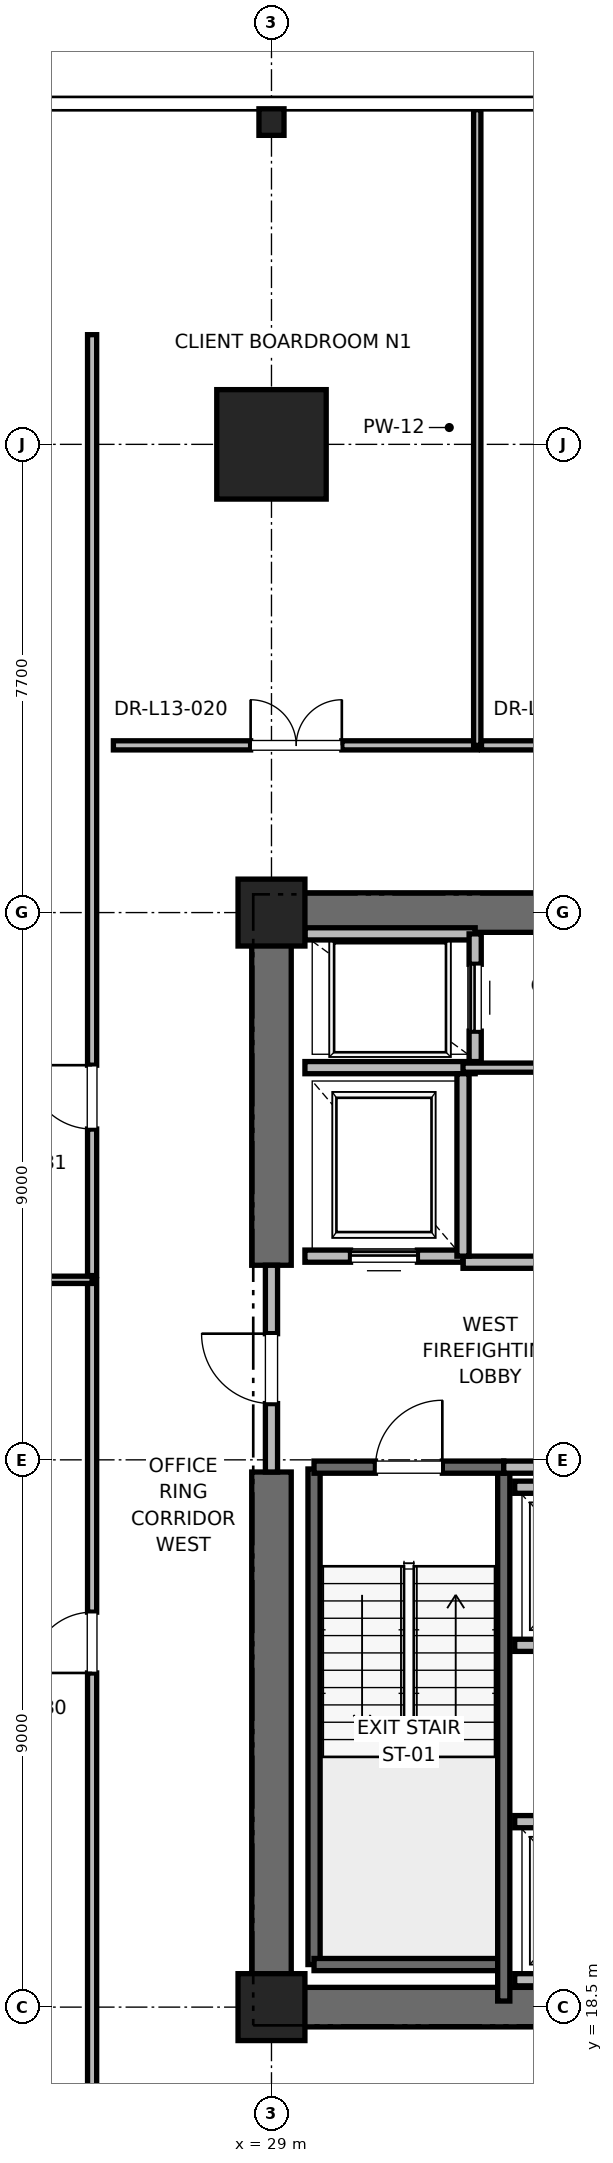
"""IFC4 building model, lengths in metres.
Left out: names, types, materials, properties, quantities, classifications, styles, units other than length and angle.
Written with IfcOpenShell. Run it as: python <this file> out.ifc"""

import sys

from ifc_helpers import new_model, si_unit, direction, frame, frame_2d, origin, origin_2d, place, context, subcontext, project, spatial, rectangle, i_section, extrude, element, fill, save


model = new_model("IFC4")
c1 = context("Model", 3, precision=1e-05, world=origin(), true_north=direction((0.0, 1.0)))
c2 = subcontext(c1, "Body", "Model", "MODEL_VIEW")
j1 = project(units=[si_unit("LENGTHUNIT", "METRE"), si_unit("PLANEANGLEUNIT", "RADIAN")], contexts=[c1])
p1 = place(None, origin())
s1 = spatial("IfcSite", under=j1, at=p1, CompositionType="ELEMENT")
p2 = place(p1, origin())
s2 = spatial("IfcBuilding", under=s1, at=p2, CompositionType="ELEMENT")
p3 = place(p2, frame((0.0, 0.0, 59.6)))
s3 = spatial("IfcBuildingStorey", under=s2, at=p3, CompositionType="ELEMENT", Elevation=59.6)
p4 = place(p3, frame((29.0, 44.2, 0.0), z_axis=(0.0, 0.0, 1.0), x_axis=(1.0, 0.0, 0.0)))
e1 = element("IfcColumn", 1, at=p4, inside=s3, PredefinedType="COLUMN", context=c2, shape_type="SweptSolid", body=[
    extrude(rectangle(XDim=1.8, YDim=1.8, at=origin_2d()), origin(), (0.0, 0.0, 1.0), 4.0),
])
p5 = place(p3, frame((29.0, 49.5, 0.0), z_axis=(0.0, 0.0, 1.0), x_axis=(1.0, 0.0, 0.0)))
e2 = element("IfcColumn", 2, at=p5, inside=s3, PredefinedType="COLUMN", context=c2, shape_type="SweptSolid", body=[
    extrude(i_section(OverallWidth=0.412, OverallDepth=0.437, WebThickness=0.036, FlangeThickness=0.058, FilletRadius=0.015, at=origin_2d()), origin(), (0.0, 0.0, 1.0), 4.0),
])
for number, where, z_axis, x_axis in (
    (3, (29.0, 18.5, 0.0), (0.0, 0.0, 1.0), (1.0, 0.0, 0.0)),
    (4, (29.0, 36.5, 0.0), (0.0, 0.0, 1.0), (1.0, 0.0, 0.0)),
):
    element("IfcColumn", number, at=place(p3, frame(where, z_axis=z_axis, x_axis=x_axis)), inside=s3, PredefinedType="PILASTER", context=c2, shape_type="SweptSolid", body=[
        extrude(rectangle(XDim=1.1, YDim=1.1, at=origin_2d()), origin(), (0.0, 0.0, 1.0), 4.0),
    ])
p6 = place(p3, frame((29.0, 18.5, 0.0), z_axis=(0.0, 0.0, 1.0), x_axis=(1.0, 0.0, 0.0)))
e5 = element("IfcWall", 5, at=p6, inside=s3, PredefinedType="SHEAR", context=c2, shape_type="SweptSolid", body=[
    extrude(rectangle(XDim=9.2, YDim=0.65, at=frame_2d((4.6, 0.0))), origin(), (0.0, 0.0, 1.0), 3.76),
])
p7 = place(p3, frame((29.0, 36.5, 0.0), z_axis=(0.0, 0.0, 1.0), x_axis=(1.0, 0.0, 0.0)))
e6 = element("IfcWall", 6, at=p7, inside=s3, PredefinedType="SHEAR", context=c2, shape_type="SweptSolid", body=[
    extrude(rectangle(XDim=5.8, YDim=0.65, at=frame_2d((2.9, 0.0))), origin(), (0.0, 0.0, 1.0), 3.76),
])
p8 = place(p3, frame((29.0, 18.5, 0.0), z_axis=(0.0, 0.0, 1.0), x_axis=(0.0, 1.0, 0.0)))
e7 = element("IfcWall", 7, at=p8, inside=s3, PredefinedType="SHEAR", context=c2, shape_type="SweptSolid", body=[
    extrude(rectangle(XDim=8.8, YDim=0.65, at=frame_2d((4.4, 0.0))), origin(), (0.0, 0.0, 1.0), 3.76),
])
p9 = place(p3, frame((29.0, 30.7, 0.0), z_axis=(0.0, 0.0, 1.0), x_axis=(0.0, 1.0, 0.0)))
e8 = element("IfcWall", 8, at=p9, inside=s3, PredefinedType="SHEAR", context=c2, shape_type="SweptSolid", body=[
    extrude(rectangle(XDim=5.8, YDim=0.65, at=frame_2d((2.9, 0.0))), origin(), (0.0, 0.0, 1.0), 3.76),
])
p10 = place(p3, frame((29.7, 19.2, 0.0), z_axis=(0.0, 0.0, 1.0), x_axis=(0.0, 1.0, 0.0)))
e9 = element("IfcWall", 9, at=p10, inside=s3, PredefinedType="SOLIDWALL", context=c2, shape_type="SweptSolid", body=[
    extrude(rectangle(XDim=8.15, YDim=0.2, at=frame_2d((4.075, 0.0))), origin(), (0.0, 0.0, 1.0), 3.76),
])
p11 = place(p3, frame((29.7, 19.2, 0.0), z_axis=(0.0, 0.0, 1.0), x_axis=(1.0, 0.0, 0.0)))
e10 = element("IfcWall", 10, at=p11, inside=s3, PredefinedType="SOLIDWALL", context=c2, shape_type="SweptSolid", body=[
    extrude(rectangle(XDim=3.12, YDim=0.2, at=frame_2d((1.56, 0.0))), origin(), (0.0, 0.0, 1.0), 3.76),
])
p12 = place(p3, frame((32.82, 18.6, 0.0), z_axis=(0.0, 0.0, 1.0), x_axis=(0.0, 1.0, 0.0)))
e11 = element("IfcWall", 11, at=p12, inside=s3, PredefinedType="SOLIDWALL", context=c2, shape_type="SweptSolid", body=[
    extrude(rectangle(XDim=8.78, YDim=0.2, at=frame_2d((4.39, 0.0))), origin(), (0.0, 0.0, 1.0), 3.76),
])
p13 = place(p3, frame((29.7, 27.38, 0.0), z_axis=(0.0, 0.0, 1.0), x_axis=(1.0, 0.0, 0.0)))
e12 = element("IfcWall", 12, at=p13, inside=s3, PredefinedType="SOLIDWALL", context=c2, shape_type="SweptSolid", body=[
    extrude(rectangle(XDim=3.12, YDim=0.2, at=frame_2d((1.56, 0.0))), origin(), (0.0, 0.0, 1.0), 3.76),
])
p14 = place(p13, frame((1.01, 0.0, 0.0)))
e13 = element("IfcOpeningElement", 13, at=p14, cuts=e12, PredefinedType="OPENING", context=c2, shape_type="SweptSolid", body=[
    extrude(rectangle(XDim=1.1, YDim=2.15, at=frame_2d((0.55, 1.075))), frame((0.0, 0.1, 0.0), z_axis=(0.0, -1.0, 0.0), x_axis=(1.0, 0.0, 0.0)), (0.0, 0.0, 1.0), 0.2),
])
p15 = place(p3, frame((29.0, 27.3, 0.0), z_axis=(0.0, 0.0, 1.0), x_axis=(0.0, 1.0, 0.0)))
e14 = element("IfcWall", 14, at=p15, inside=s3, PredefinedType="PARTITIONING", context=c2, shape_type="SweptSolid", body=[
    extrude(rectangle(XDim=3.4, YDim=0.2, at=frame_2d((1.7, 0.0))), origin(), (0.0, 0.0, 1.0), 2.54),
])
p16 = place(p15, frame((1.125, 0.0, 0.0)))
e15 = element("IfcOpeningElement", 15, at=p16, cuts=e14, PredefinedType="OPENING", context=c2, shape_type="SweptSolid", body=[
    extrude(rectangle(XDim=1.15, YDim=2.2, at=frame_2d((0.575, 1.1))), frame((0.0, 0.1, 0.0), z_axis=(0.0, -1.0, 0.0), x_axis=(1.0, 0.0, 0.0)), (0.0, 0.0, 1.0), 0.2),
])
p17 = place(p3, frame((32.82, 27.38, 0.0), z_axis=(0.0, 0.0, 1.0), x_axis=(1.0, 0.0, 0.0)))
e16 = element("IfcWall", 16, at=p17, inside=s3, PredefinedType="PARTITIONING", context=c2, shape_type="SweptSolid", body=[
    extrude(rectangle(XDim=5.62, YDim=0.2, at=frame_2d((2.81, 0.0))), origin(), (0.0, 0.0, 1.0), 3.76),
])
p18 = place(p3, frame((32.15, 30.75, 0.0), z_axis=(0.0, 0.0, 1.0), x_axis=(1.0, 0.0, 0.0)))
e17 = element("IfcWall", 17, at=p18, inside=s3, PredefinedType="PARTITIONING", context=c2, shape_type="SweptSolid", body=[
    extrude(rectangle(XDim=3.13, YDim=0.2, at=frame_2d((1.565, 0.0))), origin(), (0.0, 0.0, 1.0), 3.76),
])
p19 = place(p3, frame((29.55, 30.85, 0.0), z_axis=(0.0, 0.0, 1.0), x_axis=(1.0, 0.0, 0.0)))
e18 = element("IfcWall", 18, at=p19, inside=s3, PredefinedType="SOLIDWALL", context=c2, shape_type="SweptSolid", body=[
    extrude(rectangle(XDim=2.6, YDim=0.2, at=frame_2d((1.3, 0.0))), origin(), (0.0, 0.0, 1.0), 2.54),
])
p20 = place(p19, frame((0.75, 0.0, 0.0)))
e19 = element("IfcOpeningElement", 19, at=p20, cuts=e18, PredefinedType="OPENING", context=c2, shape_type="SweptSolid", body=[
    extrude(rectangle(XDim=1.1, YDim=2.2, at=frame_2d((0.55, 1.1))), frame((0.0, 0.1, 0.0), z_axis=(0.0, -1.0, 0.0), x_axis=(1.0, 0.0, 0.0)), (0.0, 0.0, 1.0), 0.2),
])
p21 = place(p3, frame((29.55, 33.95, 0.0), z_axis=(0.0, 0.0, 1.0), x_axis=(1.0, 0.0, 0.0)))
e20 = element("IfcWall", 20, at=p21, inside=s3, PredefinedType="SOLIDWALL", context=c2, shape_type="SweptSolid", body=[
    extrude(rectangle(XDim=2.8, YDim=0.2, at=frame_2d((1.4, 0.0))), origin(), (0.0, 0.0, 1.0), 3.76),
])
p22 = place(p3, frame((32.15, 30.85, 0.0), z_axis=(0.0, 0.0, 1.0), x_axis=(0.0, 1.0, 0.0)))
e21 = element("IfcWall", 21, at=p22, inside=s3, PredefinedType="SOLIDWALL", context=c2, shape_type="SweptSolid", body=[
    extrude(rectangle(XDim=3.0, YDim=0.2, at=frame_2d((1.5, 0.0))), origin(), (0.0, 0.0, 1.0), 3.76),
])
p23 = place(p3, frame((32.35, 36.15, 0.0), z_axis=(0.0, 0.0, 1.0), x_axis=(-1.0, 0.0, 0.0)))
e22 = element("IfcWall", 22, at=p23, inside=s3, PredefinedType="SOLIDWALL", context=c2, shape_type="SweptSolid", body=[
    extrude(rectangle(XDim=2.8, YDim=0.2, at=frame_2d((1.4, 0.0))), origin(), (0.0, 0.0, 1.0), 2.889),
])
p24 = place(p3, frame((32.35, 34.05, 0.0), z_axis=(0.0, 0.0, 1.0), x_axis=(0.0, 1.0, 0.0)))
e23 = element("IfcWall", 23, at=p24, inside=s3, PredefinedType="SOLIDWALL", context=c2, shape_type="SweptSolid", body=[
    extrude(rectangle(XDim=2.1, YDim=0.2, at=frame_2d((1.05, 0.0))), origin(), (0.0, 0.0, 1.0), 3.76),
])
p25 = place(p24, frame((0.5, 0.0, 0.0)))
e24 = element("IfcOpeningElement", 24, at=p25, cuts=e23, PredefinedType="OPENING", context=c2, shape_type="SweptSolid", body=[
    extrude(rectangle(XDim=1.1, YDim=2.2, at=frame_2d((0.55, 1.1))), frame((0.0, 0.1, 0.0), z_axis=(0.0, -1.0, 0.0), x_axis=(1.0, 0.0, 0.0)), (0.0, 0.0, 1.0), 0.2),
])
p26 = place(p3, frame((33.0, 18.95, 0.0), z_axis=(0.0, 0.0, 1.0), x_axis=(1.0, 0.0, 0.0)))
e25 = element("IfcWall", 25, at=p26, inside=s3, PredefinedType="SOLIDWALL", context=c2, shape_type="SweptSolid", body=[
    extrude(rectangle(XDim=2.3, YDim=0.2, at=frame_2d((1.15, 0.0))), origin(), (0.0, 0.0, 1.0), 3.76),
])
p27 = place(p3, frame((35.3, 21.55, 0.0), z_axis=(0.0, 0.0, 1.0), x_axis=(-1.0, 0.0, 0.0)))
e26 = element("IfcWall", 26, at=p27, inside=s3, PredefinedType="SOLIDWALL", context=c2, shape_type="SweptSolid", body=[
    extrude(rectangle(XDim=2.3, YDim=0.2, at=frame_2d((1.15, 0.0))), origin(), (0.0, 0.0, 1.0), 3.76),
])
p28 = place(p27, frame((0.6, 0.0, 0.0)))
e27 = element("IfcOpeningElement", 27, at=p28, cuts=e26, PredefinedType="OPENING", context=c2, shape_type="SweptSolid", body=[
    extrude(rectangle(XDim=1.1, YDim=2.2, at=frame_2d((0.55, 1.1))), frame((0.0, 0.1, 0.0), z_axis=(0.0, -1.0, 0.0), x_axis=(1.0, 0.0, 0.0)), (0.0, 0.0, 1.0), 0.2),
])
p29 = place(p3, frame((33.0, 24.45, 0.0), z_axis=(0.0, 0.0, 1.0), x_axis=(1.0, 0.0, 0.0)))
e28 = element("IfcWall", 28, at=p29, inside=s3, PredefinedType="SOLIDWALL", context=c2, shape_type="SweptSolid", body=[
    extrude(rectangle(XDim=2.3, YDim=0.2, at=frame_2d((1.15, 0.0))), origin(), (0.0, 0.0, 1.0), 3.76),
])
p30 = place(p29, frame((0.6, 0.0, 0.0)))
e29 = element("IfcOpeningElement", 29, at=p30, cuts=e28, PredefinedType="OPENING", context=c2, shape_type="SweptSolid", body=[
    extrude(rectangle(XDim=1.1, YDim=2.2, at=frame_2d((0.55, 1.1))), frame((0.0, 0.1, 0.0), z_axis=(0.0, -1.0, 0.0), x_axis=(1.0, 0.0, 0.0)), (0.0, 0.0, 1.0), 0.2),
])
p31 = place(p3, frame((35.3, 27.05, 0.0), z_axis=(0.0, 0.0, 1.0), x_axis=(-1.0, 0.0, 0.0)))
e30 = element("IfcWall", 30, at=p31, inside=s3, PredefinedType="SOLIDWALL", context=c2, shape_type="SweptSolid", body=[
    extrude(rectangle(XDim=2.3, YDim=0.2, at=frame_2d((1.15, 0.0))), origin(), (0.0, 0.0, 1.0), 3.76),
])
p32 = place(p3, frame((32.15, 33.95, 0.0), z_axis=(0.0, 0.0, 1.0), x_axis=(1.0, 0.0, 0.0)))
e31 = element("IfcWall", 31, at=p32, inside=s3, PredefinedType="PARTITIONING", context=c2, shape_type="SweptSolid", body=[
    extrude(rectangle(XDim=3.13, YDim=0.15, at=frame_2d((1.565, 0.0))), origin(), (0.0, 0.0, 1.0), 2.85),
])
p33 = place(p3, frame((26.4, 39.25, 0.0), z_axis=(0.0, 0.0, 1.0), x_axis=(1.0, 0.0, 0.0)))
e32 = element("IfcWall", 32, at=p33, inside=s3, PredefinedType="PARTITIONING", context=c2, shape_type="SweptSolid", body=[
    extrude(rectangle(XDim=5.984, YDim=0.15, at=frame_2d((2.992, 0.0))), origin(), (0.0, 0.0, 1.0), 2.85),
])
p34 = place(p33, frame((2.257, 0.0, 0.0)))
e33 = element("IfcOpeningElement", 33, at=p34, cuts=e32, PredefinedType="OPENING", context=c2, shape_type="SweptSolid", body=[
    extrude(rectangle(XDim=1.5, YDim=2.25, at=frame_2d((0.75, 1.125))), frame((0.0, 0.075, 0.0), z_axis=(0.0, -1.0, 0.0), x_axis=(1.0, 0.0, 0.0)), (0.0, 0.0, 1.0), 0.15),
])
p35 = place(p3, frame((32.384, 39.25, 0.0), z_axis=(0.0, 0.0, 1.0), x_axis=(0.0, 1.0, 0.0)))
e34 = element("IfcWall", 34, at=p35, inside=s3, PredefinedType="PARTITIONING", context=c2, shape_type="SweptSolid", body=[
    extrude(rectangle(XDim=10.454, YDim=0.12, at=frame_2d((5.227, 0.0))), origin(), (0.0, 0.0, 1.0), 2.39),
])
p36 = place(p3, frame((32.454, 39.25, 0.0), z_axis=(0.0, 0.0, 1.0), x_axis=(1.0, 0.0, 0.0)))
e35 = element("IfcWall", 35, at=p36, inside=s3, PredefinedType="PARTITIONING", context=c2, shape_type="SweptSolid", body=[
    extrude(rectangle(XDim=6.458, YDim=0.15, at=frame_2d((3.229, 0.0))), origin(), (0.0, 0.0, 1.0), 2.85),
])
p37 = place(p36, frame((2.694, 0.0, 0.0)))
e36 = element("IfcOpeningElement", 36, at=p37, cuts=e35, PredefinedType="OPENING", context=c2, shape_type="SweptSolid", body=[
    extrude(rectangle(XDim=1.0, YDim=2.15, at=frame_2d((0.5, 1.075))), frame((0.0, 0.075, 0.0), z_axis=(0.0, -1.0, 0.0), x_axis=(1.0, 0.0, 0.0)), (0.0, 0.0, 1.0), 0.15),
])
p38 = place(p3, frame((26.05, 8.996, 0.0), z_axis=(0.0, 0.0, 1.0), x_axis=(0.0, 1.0, 0.0)))
e37 = element("IfcWall", 37, at=p38, inside=s3, PredefinedType="PARTITIONING", context=c2, shape_type="SweptSolid", body=[
    extrude(rectangle(XDim=21.464, YDim=0.15, at=frame_2d((10.732, 0.0))), origin(), (0.0, 0.0, 1.0), 2.85),
])
p39 = place(p38, frame((14.999, 0.0, 0.0)))
e38 = element("IfcOpeningElement", 38, at=p39, cuts=e37, PredefinedType="OPENING", context=c2, shape_type="SweptSolid", body=[
    extrude(rectangle(XDim=1.0, YDim=2.15, at=frame_2d((0.5, 1.075))), frame((0.0, 0.075, 0.0), z_axis=(0.0, -1.0, 0.0), x_axis=(1.0, 0.0, 0.0)), (0.0, 0.0, 1.0), 0.15),
])
p40 = place(p3, frame((14.295, 30.461, 0.0), z_axis=(0.0, 0.0, 1.0), x_axis=(1.0, 0.0, 0.0)))
e39 = element("IfcWall", 39, at=p40, inside=s3, PredefinedType="PARTITIONING", context=c2, shape_type="SweptSolid", body=[
    extrude(rectangle(XDim=11.755, YDim=0.12, at=frame_2d((5.877, 0.0))), origin(), (0.0, 0.0, 1.0), 2.85),
])
p41 = place(p3, frame((26.05, 30.531, 0.0), z_axis=(0.0, 0.0, 1.0), x_axis=(0.0, 1.0, 0.0)))
e40 = element("IfcWall", 40, at=p41, inside=s3, PredefinedType="PARTITIONING", context=c2, shape_type="SweptSolid", body=[
    extrude(rectangle(XDim=15.473, YDim=0.15, at=frame_2d((7.737, 0.0))), origin(), (0.0, 0.0, 1.0), 2.85),
])
p42 = place(p41, frame((2.41, 0.0, 0.0)))
e41 = element("IfcOpeningElement", 41, at=p42, cuts=e40, PredefinedType="OPENING", context=c2, shape_type="SweptSolid", body=[
    extrude(rectangle(XDim=1.05, YDim=2.2, at=frame_2d((0.525, 1.1))), frame((0.0, 0.075, 0.0), z_axis=(0.0, -1.0, 0.0), x_axis=(1.0, 0.0, 0.0)), (0.0, 0.0, 1.0), 0.15),
])
p43 = place(p14, origin())
e42 = element("IfcDoor", 42, at=p43, inside=s3, OperationType="SINGLE_SWING_RIGHT", PredefinedType="DOOR", context=c2, shape_type="SweptSolid", body=[
    extrude(rectangle(XDim=1.1, YDim=2.15, at=frame_2d((0.55, 1.075))), frame((0.0, 0.025, 0.0), z_axis=(0.0, -1.0, 0.0), x_axis=(1.0, 0.0, 0.0)), (0.0, 0.0, 1.0), 0.05),
])
fill(e13, e42)
p44 = place(p16, origin())
e43 = element("IfcDoor", 43, at=p44, inside=s3, OperationType="SINGLE_SWING_RIGHT", PredefinedType="DOOR", context=c2, shape_type="SweptSolid", body=[
    extrude(rectangle(XDim=1.15, YDim=2.2, at=frame_2d((0.575, 1.1))), frame((0.0, 0.025, 0.0), z_axis=(0.0, -1.0, 0.0), x_axis=(1.0, 0.0, 0.0)), (0.0, 0.0, 1.0), 0.05),
])
fill(e15, e43)
p45 = place(p20, origin())
e44 = element("IfcDoor", 44, at=p45, inside=s3, OperationType="SLIDING_TO_RIGHT", PredefinedType="DOOR", context=c2, shape_type="SweptSolid", body=[
    extrude(rectangle(XDim=1.1, YDim=2.2, at=frame_2d((0.55, 1.1))), frame((0.0, 0.025, 0.0), z_axis=(0.0, -1.0, 0.0), x_axis=(1.0, 0.0, 0.0)), (0.0, 0.0, 1.0), 0.05),
])
fill(e19, e44)
p46 = place(p25, origin())
e45 = element("IfcDoor", 45, at=p46, inside=s3, OperationType="SLIDING_TO_RIGHT", PredefinedType="DOOR", context=c2, shape_type="SweptSolid", body=[
    extrude(rectangle(XDim=1.1, YDim=2.2, at=frame_2d((0.55, 1.1))), frame((0.0, 0.025, 0.0), z_axis=(0.0, -1.0, 0.0), x_axis=(1.0, 0.0, 0.0)), (0.0, 0.0, 1.0), 0.05),
])
fill(e24, e45)
p47 = place(p34, origin())
e46 = element("IfcDoor", 46, at=p47, inside=s3, OperationType="DOUBLE_DOOR_SINGLE_SWING", PredefinedType="DOOR", context=c2, shape_type="SweptSolid", body=[
    extrude(rectangle(XDim=1.5, YDim=2.25, at=frame_2d((0.75, 1.125))), frame((0.0, 0.025, 0.0), z_axis=(0.0, -1.0, 0.0), x_axis=(1.0, 0.0, 0.0)), (0.0, 0.0, 1.0), 0.05),
])
fill(e33, e46)
p48 = place(p39, origin())
e47 = element("IfcDoor", 47, at=p48, inside=s3, OperationType="SINGLE_SWING_LEFT", PredefinedType="DOOR", context=c2, shape_type="SweptSolid", body=[
    extrude(rectangle(XDim=1.0, YDim=2.15, at=frame_2d((0.5, 1.075))), frame((0.0, 0.025, 0.0), z_axis=(0.0, -1.0, 0.0), x_axis=(1.0, 0.0, 0.0)), (0.0, 0.0, 1.0), 0.05),
])
fill(e38, e47)
p49 = place(p42, origin())
e48 = element("IfcDoor", 48, at=p49, inside=s3, OperationType="SINGLE_SWING_RIGHT", PredefinedType="DOOR", context=c2, shape_type="SweptSolid", body=[
    extrude(rectangle(XDim=1.05, YDim=2.2, at=frame_2d((0.525, 1.1))), frame((0.0, 0.025, 0.0), z_axis=(0.0, -1.0, 0.0), x_axis=(1.0, 0.0, 0.0)), (0.0, 0.0, 1.0), 0.05),
])
fill(e41, e48)
save(model, sys.argv[1])
